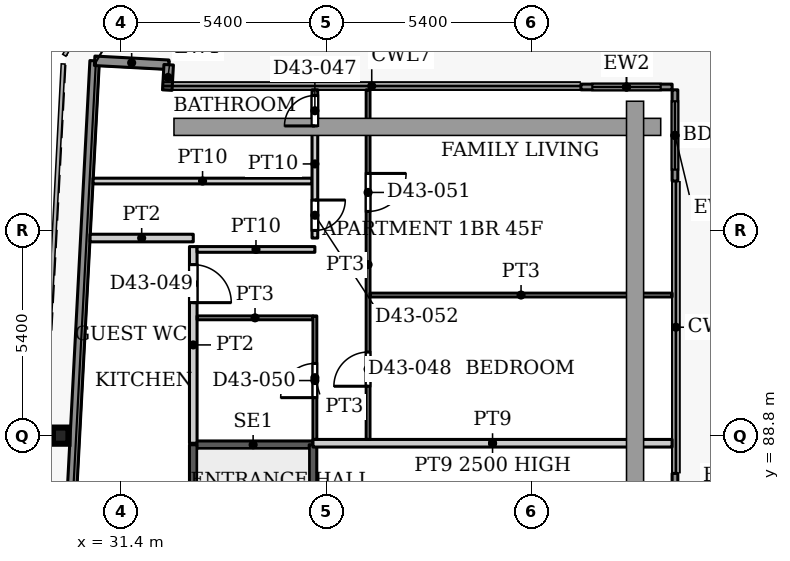
"""IFC4 building model, lengths in metres.
Left out: names, types, materials, properties, quantities, classifications, styles, units other than length and angle.
Written with IfcOpenShell. Run it as: python <this file> out.ifc"""

import sys

from ifc_helpers import new_model, si_unit, direction, frame, frame_2d, origin, origin_2d, place, context, subcontext, project, spatial, rectangle, i_section, extrude, source, transform, mapped, element, fill, save


model = new_model("IFC4")
c1 = context("Model", 3, precision=1e-05, world=origin(), true_north=direction((0.0, 1.0)))
c2 = subcontext(c1, "Body", "Model", "MODEL_VIEW")
j1 = project(units=[si_unit("LENGTHUNIT", "METRE"), si_unit("PLANEANGLEUNIT", "RADIAN")], contexts=[c1])
p1 = place(None, origin())
s1 = spatial("IfcSite", under=j1, at=p1, CompositionType="ELEMENT")
p2 = place(p1, origin())
s2 = spatial("IfcBuilding", under=s1, at=p2, CompositionType="ELEMENT")
p3 = place(p2, frame((0.0, 0.0, 191.6)))
s3 = spatial("IfcBuildingStorey", under=s2, at=p3, CompositionType="ELEMENT", Elevation=191.6)
p4 = place(p3, frame((29.811, 88.8, 0.0), z_axis=(0.0, 0.0, 1.0), x_axis=(1.0, 0.0, 0.0)))
e1 = element("IfcColumn", 1, at=p4, inside=s3, PredefinedType="COLUMN", context=c2, shape_type="SweptSolid", body=[
    extrude(i_section(OverallWidth=0.409, OverallDepth=0.425, WebThickness=0.033, FlangeThickness=0.052, FilletRadius=0.013, at=origin_2d()), origin(), (0.0, 0.0, 1.0), 3.9),
])
p5 = place(p3, frame((27.195, 31.969, 0.0), z_axis=(0.0, 0.0, 1.0), x_axis=(0.052554995867, 0.998618031286, 0.0)))
e2 = element("IfcWall", 2, at=p5, inside=s3, PredefinedType="SOLIDWALL", context=c2, shape_type="SweptSolid", body=[
    extrude(rectangle(XDim=66.787, YDim=0.25, at=frame_2d((33.394, 0.0))), origin(), (0.0, 0.0, 1.0), 3.75),
])
p6 = place(p3, frame((30.705, 98.664, 0.0), z_axis=(0.0, 0.0, 1.0), x_axis=(0.998577785791, -0.053314216913, 0.0)))
e3 = element("IfcWall", 3, at=p6, inside=s3, PredefinedType="SOLIDWALL", context=c2, shape_type="SweptSolid", body=[
    extrude(rectangle(XDim=1.951, YDim=0.25, at=frame_2d((0.975, 0.0))), origin(), (0.0, 0.0, 1.0), 3.75),
])
p7 = place(p3, frame((32.653, 98.56, 0.0), z_axis=(0.0, 0.0, 1.0), x_axis=(-0.054093451632, -0.998535877418, 0.0)))
e4 = element("IfcWall", 4, at=p7, inside=s3, PredefinedType="SOLIDWALL", context=c2, shape_type="SweptSolid", body=[
    extrude(rectangle(XDim=0.668, YDim=0.25, at=frame_2d((0.334, 0.0))), origin(), (0.0, 0.0, 1.0), 3.75),
])
p8 = place(p3, frame((43.5, 97.975, 0.0), z_axis=(0.0, 0.0, 1.0), x_axis=(1.0, 0.0, 0.0)))
e5 = element("IfcWall", 5, at=p8, inside=s3, PredefinedType="SOLIDWALL", context=c2, shape_type="SweptSolid", body=[
    extrude(rectangle(XDim=2.4, YDim=0.15, at=frame_2d((1.2, 0.0))), origin(), (0.0, 0.0, 1.0), 3.75),
])
p9 = place(p8, frame((0.3, 0.0, 0.0)))
e6 = element("IfcOpeningElement", 6, at=p9, cuts=e5, PredefinedType="OPENING", context=c2, shape_type="SweptSolid", body=[
    extrude(rectangle(XDim=1.8, YDim=2.4, at=frame_2d((0.9, 1.2))), frame((0.0, 0.085, 0.0), z_axis=(0.0, -1.0, 0.0), x_axis=(1.0, 0.0, 0.0)), (0.0, 0.0, 1.0), 0.17),
])
p10 = place(p3, frame((45.975, 97.9, 0.0), z_axis=(0.0, 0.0, 1.0), x_axis=(0.0, -1.0, 0.0)))
e7 = element("IfcWall", 7, at=p10, inside=s3, PredefinedType="SOLIDWALL", context=c2, shape_type="SweptSolid", body=[
    extrude(rectangle(XDim=2.4, YDim=0.15, at=frame_2d((1.2, 0.0))), origin(), (0.0, 0.0, 1.0), 3.75),
])
p11 = place(p10, frame((0.3, 0.0, 0.0)))
e8 = element("IfcOpeningElement", 8, at=p11, cuts=e7, PredefinedType="OPENING", context=c2, shape_type="SweptSolid", body=[
    extrude(rectangle(XDim=1.8, YDim=2.4, at=frame_2d((0.9, 1.2))), frame((0.0, 0.085, 0.0), z_axis=(0.0, -1.0, 0.0), x_axis=(1.0, 0.0, 0.0)), (0.0, 0.0, 1.0), 0.17),
])
p12 = place(p3, frame((45.975, 87.806, 0.0), z_axis=(0.0, 0.0, 1.0), x_axis=(0.0, -1.0, 0.0)))
e9 = element("IfcWall", 9, at=p12, inside=s3, PredefinedType="SOLIDWALL", context=c2, shape_type="SweptSolid", body=[
    extrude(rectangle(XDim=2.4, YDim=0.15, at=frame_2d((1.2, 0.0))), origin(), (0.0, 0.0, 1.0), 3.75),
])
p13 = place(p12, frame((0.3, 0.0, 0.0)))
e10 = element("IfcOpeningElement", 10, at=p13, cuts=e9, PredefinedType="OPENING", context=c2, shape_type="SweptSolid", body=[
    extrude(rectangle(XDim=1.8, YDim=2.4, at=frame_2d((0.9, 1.2))), frame((0.0, 0.085, 0.0), z_axis=(0.0, -1.0, 0.0), x_axis=(1.0, 0.0, 0.0)), (0.0, 0.0, 1.0), 0.17),
])
p14 = place(p3, frame((33.3, 88.56, 0.0), z_axis=(0.0, 0.0, 1.0), x_axis=(1.0, 0.0, 0.0)))
e11 = element("IfcWall", 11, at=p14, inside=s3, PredefinedType="SHEAR", context=c2, shape_type="SweptSolid", body=[
    extrude(rectangle(XDim=3.15, YDim=0.2, at=frame_2d((1.575, 0.0))), origin(), (0.0, 0.0, 1.0), 3.9),
])
p15 = place(p3, frame((33.3, 79.4, 0.0), z_axis=(0.0, 0.0, 1.0), x_axis=(0.0, 1.0, 0.0)))
e12 = element("IfcWall", 12, at=p15, inside=s3, PredefinedType="SHEAR", context=c2, shape_type="SweptSolid", body=[
    extrude(rectangle(XDim=9.16, YDim=0.2, at=frame_2d((4.58, 0.0))), origin(), (0.0, 0.0, 1.0), 3.9),
])
p16 = place(p15, frame((0.35, 0.0, 0.0)))
e13 = element("IfcOpeningElement", 13, at=p16, cuts=e12, PredefinedType="OPENING", context=c2, shape_type="SweptSolid", body=[
    extrude(rectangle(XDim=1.1, YDim=2.2, at=frame_2d((0.55, 1.1))), frame((0.0, 0.11, 0.0), z_axis=(0.0, -1.0, 0.0), x_axis=(1.0, 0.0, 0.0)), (0.0, 0.0, 1.0), 0.22),
])
p17 = place(p3, frame((36.45, 79.4, 0.0), z_axis=(0.0, 0.0, 1.0), x_axis=(0.0, 1.0, 0.0)))
e14 = element("IfcWall", 14, at=p17, inside=s3, PredefinedType="SHEAR", context=c2, shape_type="SweptSolid", body=[
    extrude(rectangle(XDim=9.16, YDim=0.2, at=frame_2d((4.58, 0.0))), origin(), (0.0, 0.0, 1.0), 3.9),
])
p18 = place(p3, frame((30.664, 95.5, 0.0), z_axis=(0.0, 0.0, 1.0), x_axis=(1.0, 0.0, 0.0)))
e15 = element("IfcWall", 15, at=p18, inside=s3, PredefinedType="PARTITIONING", context=c2, shape_type="SweptSolid", body=[
    extrude(rectangle(XDim=5.761, YDim=0.15, at=frame_2d((2.88, 0.0))), origin(), (0.0, 0.0, 1.0), 3.6),
])
p19 = place(p3, frame((30.585, 94.0, 0.0), z_axis=(0.0, 0.0, 1.0), x_axis=(1.0, 0.0, 0.0)))
e16 = element("IfcWall", 16, at=p19, inside=s3, PredefinedType="PARTITIONING", context=c2, shape_type="SweptSolid", body=[
    extrude(rectangle(XDim=2.715, YDim=0.2, at=frame_2d((1.358, 0.0))), origin(), (0.0, 0.0, 1.0), 3.6),
])
p20 = place(p3, frame((33.3, 88.6, 0.0), z_axis=(0.0, 0.0, 1.0), x_axis=(0.0, 1.0, 0.0)))
e17 = element("IfcWall", 17, at=p20, inside=s3, PredefinedType="PARTITIONING", context=c2, shape_type="SweptSolid", body=[
    extrude(rectangle(XDim=5.175, YDim=0.2, at=frame_2d((2.587, 0.0))), origin(), (0.0, 0.0, 1.0), 3.6),
])
p21 = place(p20, frame((3.7, 0.0, 0.0)))
e18 = element("IfcOpeningElement", 18, at=p21, cuts=e17, PredefinedType="OPENING", context=c2, shape_type="SweptSolid", body=[
    extrude(rectangle(XDim=1.0, YDim=2.1, at=frame_2d((0.5, 1.05))), frame((0.0, 0.11, 0.0), z_axis=(0.0, -1.0, 0.0), x_axis=(1.0, 0.0, 0.0)), (0.0, 0.0, 1.0), 0.22),
])
p22 = place(p3, frame((33.4, 91.9, 0.0), z_axis=(0.0, 0.0, 1.0), x_axis=(1.0, 0.0, 0.0)))
e19 = element("IfcWall", 19, at=p22, inside=s3, PredefinedType="PARTITIONING", context=c2, shape_type="SweptSolid", body=[
    extrude(rectangle(XDim=3.05, YDim=0.1, at=frame_2d((1.525, 0.0))), origin(), (0.0, 0.0, 1.0), 3.6),
])
p23 = place(p3, frame((33.4, 93.7, 0.0), z_axis=(0.0, 0.0, 1.0), x_axis=(1.0, 0.0, 0.0)))
e20 = element("IfcWall", 20, at=p23, inside=s3, PredefinedType="PARTITIONING", context=c2, shape_type="SweptSolid", body=[
    extrude(rectangle(XDim=3.1, YDim=0.15, at=frame_2d((1.55, 0.0))), origin(), (0.0, 0.0, 1.0), 3.6),
])
p24 = place(p3, frame((36.45, 88.6, 0.0), z_axis=(0.0, 0.0, 1.0), x_axis=(1.0, 0.0, 0.0)))
e21 = element("IfcWall", 21, at=p24, inside=s3, PredefinedType="PARTITIONING", context=c2, shape_type="SweptSolid", body=[
    extrude(rectangle(XDim=9.45, YDim=0.2, at=frame_2d((4.725, 0.0))), origin(), (0.0, 0.0, 1.0), 2.5),
])
p25 = place(p3, frame((36.5, 88.7, 0.0), z_axis=(0.0, 0.0, 1.0), x_axis=(0.0, 1.0, 0.0)))
e22 = element("IfcWall", 22, at=p25, inside=s3, PredefinedType="PARTITIONING", context=c2, shape_type="SweptSolid", body=[
    extrude(rectangle(XDim=3.25, YDim=0.1, at=frame_2d((1.625, 0.0))), origin(), (0.0, 0.0, 1.0), 3.6),
])
p26 = place(p25, frame((1.1, 0.0, 0.0)))
e23 = element("IfcOpeningElement", 23, at=p26, cuts=e22, PredefinedType="OPENING", context=c2, shape_type="SweptSolid", body=[
    extrude(rectangle(XDim=0.9, YDim=2.1, at=frame_2d((0.45, 1.05))), frame((0.0, 0.06, 0.0), z_axis=(0.0, -1.0, 0.0), x_axis=(1.0, 0.0, 0.0)), (0.0, 0.0, 1.0), 0.12),
])
p27 = place(p3, frame((36.5, 94.0, 0.0), z_axis=(0.0, 0.0, 1.0), x_axis=(0.0, 1.0, 0.0)))
e24 = element("IfcWall", 24, at=p27, inside=s3, PredefinedType="PARTITIONING", context=c2, shape_type="SweptSolid", body=[
    extrude(rectangle(XDim=3.9, YDim=0.15, at=frame_2d((1.95, 0.0))), origin(), (0.0, 0.0, 1.0), 3.6),
])
p28 = place(p27, frame((2.95, 0.0, 0.0)))
e25 = element("IfcOpeningElement", 25, at=p28, cuts=e24, PredefinedType="OPENING", context=c2, shape_type="SweptSolid", body=[
    extrude(rectangle(XDim=0.8, YDim=2.1, at=frame_2d((0.4, 1.05))), frame((0.0, 0.085, 0.0), z_axis=(0.0, -1.0, 0.0), x_axis=(1.0, 0.0, 0.0)), (0.0, 0.0, 1.0), 0.17),
])
p29 = place(p27, frame((0.2, 0.0, 0.0)))
e26 = element("IfcOpeningElement", 26, at=p29, cuts=e24, PredefinedType="OPENING", context=c2, shape_type="SweptSolid", body=[
    extrude(rectangle(XDim=0.8, YDim=2.1, at=frame_2d((0.4, 1.05))), frame((0.0, 0.085, 0.0), z_axis=(0.0, -1.0, 0.0), x_axis=(1.0, 0.0, 0.0)), (0.0, 0.0, 1.0), 0.17),
])
p30 = place(p3, frame((37.9, 88.7, 0.0), z_axis=(0.0, 0.0, 1.0), x_axis=(0.0, 1.0, 0.0)))
e27 = element("IfcWall", 27, at=p30, inside=s3, PredefinedType="PARTITIONING", context=c2, shape_type="SweptSolid", body=[
    extrude(rectangle(XDim=9.2, YDim=0.1, at=frame_2d((4.6, 0.0))), origin(), (0.0, 0.0, 1.0), 3.6),
])
p31 = place(p30, frame((1.4, 0.0, 0.0)))
e28 = element("IfcOpeningElement", 28, at=p31, cuts=e27, PredefinedType="OPENING", context=c2, shape_type="SweptSolid", body=[
    extrude(rectangle(XDim=0.9, YDim=2.1, at=frame_2d((0.45, 1.05))), frame((0.0, 0.06, 0.0), z_axis=(0.0, -1.0, 0.0), x_axis=(1.0, 0.0, 0.0)), (0.0, 0.0, 1.0), 0.12),
])
p32 = place(p30, frame((6.0, 0.0, 0.0)))
e29 = element("IfcOpeningElement", 29, at=p32, cuts=e27, PredefinedType="OPENING", context=c2, shape_type="SweptSolid", body=[
    extrude(rectangle(XDim=1.0, YDim=2.1, at=frame_2d((0.5, 1.05))), frame((0.0, 0.06, 0.0), z_axis=(0.0, -1.0, 0.0), x_axis=(1.0, 0.0, 0.0)), (0.0, 0.0, 1.0), 0.12),
])
p33 = place(p3, frame((37.95, 92.5, 0.0), z_axis=(0.0, 0.0, 1.0), x_axis=(1.0, 0.0, 0.0)))
e30 = element("IfcWall", 30, at=p33, inside=s3, PredefinedType="PARTITIONING", context=c2, shape_type="SweptSolid", body=[
    extrude(rectangle(XDim=7.95, YDim=0.1, at=frame_2d((3.975, 0.0))), origin(), (0.0, 0.0, 1.0), 3.6),
])
m1 = source(origin(), c2, "Body", "SweptSolid", [
    extrude(rectangle(XDim=1.8, YDim=2.4, at=frame_2d((0.9, 1.2))), frame((0.0, 0.025, 0.0), z_axis=(0.0, -1.0, 0.0), x_axis=(1.0, 0.0, 0.0)), (0.0, 0.0, 1.0), 0.05),
])
p34 = place(p9, origin())
e31 = element("IfcDoor", 31, at=p34, inside=s3, OperationType="SLIDING_TO_LEFT", PredefinedType="DOOR", context=c2, shape_type="MappedRepresentation", body=[
    mapped(m1, transform((0.0, 0.0, 0.0), x_axis=(1.0, 0.0, 0.0), y_axis=(0.0, 1.0, 0.0), z_axis=(0.0, 0.0, 1.0), scale=1.0)),
])
fill(e6, e31)
p35 = place(p11, origin())
e32 = element("IfcDoor", 32, at=p35, inside=s3, OperationType="SLIDING_TO_LEFT", PredefinedType="DOOR", context=c2, shape_type="MappedRepresentation", body=[
    mapped(m1, transform((0.0, 0.0, 0.0), x_axis=(1.0, 0.0, 0.0), y_axis=(0.0, 1.0, 0.0), z_axis=(0.0, 0.0, 1.0), scale=1.0)),
])
fill(e8, e32)
m2 = source(origin(), c2, "Body", "SweptSolid", [
    extrude(rectangle(XDim=0.8, YDim=2.1, at=frame_2d((0.4, 1.05))), frame((0.0, 0.025, 0.0), z_axis=(0.0, -1.0, 0.0), x_axis=(1.0, 0.0, 0.0)), (0.0, 0.0, 1.0), 0.05),
])
p36 = place(p28, origin())
e33 = element("IfcDoor", 33, at=p36, inside=s3, OperationType="SINGLE_SWING_LEFT", PredefinedType="DOOR", context=c2, shape_type="MappedRepresentation", body=[
    mapped(m2, transform((0.0, 0.0, 0.0), x_axis=(1.0, 0.0, 0.0), y_axis=(0.0, 1.0, 0.0), z_axis=(0.0, 0.0, 1.0), scale=1.0)),
])
fill(e25, e33)
m3 = source(origin(), c2, "Body", "SweptSolid", [
    extrude(rectangle(XDim=0.9, YDim=2.1, at=frame_2d((0.45, 1.05))), frame((0.0, 0.025, 0.0), z_axis=(0.0, -1.0, 0.0), x_axis=(1.0, 0.0, 0.0)), (0.0, 0.0, 1.0), 0.05),
])
p37 = place(p31, origin())
e34 = element("IfcDoor", 34, at=p37, inside=s3, OperationType="SINGLE_SWING_LEFT", PredefinedType="DOOR", context=c2, shape_type="MappedRepresentation", body=[
    mapped(m3, transform((0.0, 0.0, 0.0), x_axis=(1.0, 0.0, 0.0), y_axis=(0.0, 1.0, 0.0), z_axis=(0.0, 0.0, 1.0), scale=1.0)),
])
fill(e28, e34)
m4 = source(origin(), c2, "Body", "SweptSolid", [
    extrude(rectangle(XDim=1.0, YDim=2.1, at=frame_2d((0.5, 1.05))), frame((0.0, 0.025, 0.0), z_axis=(0.0, -1.0, 0.0), x_axis=(1.0, 0.0, 0.0)), (0.0, 0.0, 1.0), 0.05),
])
p38 = place(p21, origin())
e35 = element("IfcDoor", 35, at=p38, inside=s3, OperationType="SINGLE_SWING_RIGHT", PredefinedType="DOOR", context=c2, shape_type="MappedRepresentation", body=[
    mapped(m4, transform((0.0, 0.0, 0.0), x_axis=(1.0, 0.0, 0.0), y_axis=(0.0, 1.0, 0.0), z_axis=(0.0, 0.0, 1.0), scale=1.0)),
])
fill(e18, e35)
p39 = place(p26, origin())
e36 = element("IfcDoor", 36, at=p39, inside=s3, OperationType="SINGLE_SWING_LEFT", PredefinedType="DOOR", context=c2, shape_type="MappedRepresentation", body=[
    mapped(m3, transform((0.0, 0.0, 0.0), x_axis=(1.0, 0.0, 0.0), y_axis=(0.0, 1.0, 0.0), z_axis=(0.0, 0.0, 1.0), scale=1.0)),
])
fill(e23, e36)
m5 = source(origin(), c2, "Body", "SweptSolid", [
    extrude(rectangle(XDim=1.0, YDim=2.1, at=frame_2d((0.5, 1.05))), frame((0.0, 0.025, 0.0), z_axis=(0.0, -1.0, 0.0), x_axis=(1.0, 0.0, 0.0)), (0.0, 0.0, 1.0), 0.05),
])
p40 = place(p32, origin())
e37 = element("IfcDoor", 37, at=p40, inside=s3, OperationType="SINGLE_SWING_RIGHT", PredefinedType="DOOR", context=c2, shape_type="MappedRepresentation", body=[
    mapped(m5, transform((0.0, 0.0, 0.0), x_axis=(1.0, 0.0, 0.0), y_axis=(0.0, 1.0, 0.0), z_axis=(0.0, 0.0, 1.0), scale=1.0)),
])
fill(e29, e37)
p41 = place(p29, origin())
e38 = element("IfcDoor", 38, at=p41, inside=s3, OperationType="SINGLE_SWING_RIGHT", PredefinedType="DOOR", context=c2, shape_type="MappedRepresentation", body=[
    mapped(m2, transform((0.0, 0.0, 0.0), x_axis=(1.0, 0.0, 0.0), y_axis=(0.0, 1.0, 0.0), z_axis=(0.0, 0.0, 1.0), scale=1.0)),
])
fill(e26, e38)
save(model, sys.argv[1])
